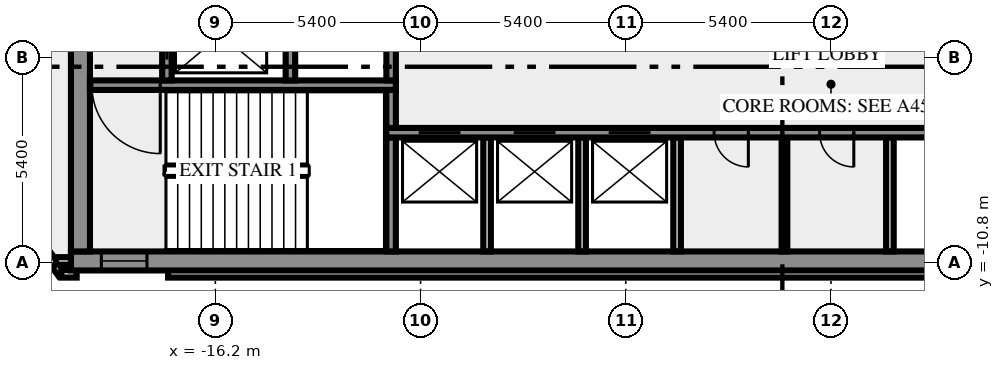
"""IFC4 building model, lengths in metres.
Left out: names, types, materials, properties, quantities, classifications, styles, units other than length and angle.
Written with IfcOpenShell. Run it as: python <this file> out.ifc"""

import sys

from ifc_helpers import new_model, si_unit, direction, frame, frame_2d, origin, place, context, subcontext, project, spatial, rectangle, extrude, element, fill, save


model = new_model("IFC4")
c1 = context("Model", 3, precision=1e-05, world=origin(), true_north=direction((0.0, 1.0)))
c2 = subcontext(c1, "Body", "Model", "MODEL_VIEW")
j1 = project(units=[si_unit("LENGTHUNIT", "METRE"), si_unit("PLANEANGLEUNIT", "RADIAN")], contexts=[c1])
p1 = place(None, origin())
s1 = spatial("IfcSite", under=j1, at=p1, CompositionType="ELEMENT")
p2 = place(p1, origin())
s2 = spatial("IfcBuilding", under=s1, at=p2, CompositionType="ELEMENT")
p3 = place(p2, frame((0.0, 0.0, 47.0)))
s3 = spatial("IfcBuildingStorey", under=s2, at=p3, CompositionType="ELEMENT", Elevation=47.0)
p4 = place(p3, frame((-21.833, -8.909, 0.0), z_axis=(0.0, 0.0, 1.0), x_axis=(0.587766567315, -0.809030569476, 0.0)))
e1 = element("IfcWall", 1, at=p4, inside=s3, PredefinedType="SOLIDWALL", context=c2, shape_type="SweptSolid", body=[
    extrude(rectangle(XDim=2.688, YDim=0.2, at=frame_2d((1.344, 0.0))), origin(), (0.0, 0.0, 1.0), 3.65),
])
p5 = place(p3, frame((-20.256, -11.088, 0.0), z_axis=(0.0, 0.0, 1.0), x_axis=(1.0, 0.0, 0.0)))
e2 = element("IfcWall", 2, at=p5, inside=s3, PredefinedType="SOLIDWALL", context=c2, shape_type="SweptSolid", body=[
    extrude(rectangle(XDim=0.406, YDim=0.2, at=frame_2d((0.203, 0.0))), origin(), (0.0, 0.0, 1.0), 3.65),
])
p6 = place(p3, frame((-17.444, -11.088, 0.0), z_axis=(0.0, 0.0, 1.0), x_axis=(1.0, 0.0, 0.0)))
e3 = element("IfcWall", 3, at=p6, inside=s3, PredefinedType="SOLIDWALL", context=c2, shape_type="SweptSolid", body=[
    extrude(rectangle(XDim=34.888, YDim=0.2, at=frame_2d((17.444, 0.0))), origin(), (0.0, 0.0, 1.0), 3.65),
])
p7 = place(p3, frame((-19.98, -10.75, 0.0), z_axis=(0.0, 0.0, 1.0), x_axis=(-1.0, 0.0, 0.0)))
e4 = element("IfcWall", 4, at=p7, inside=s3, PredefinedType="SOLIDWALL", context=c2, shape_type="SweptSolid", body=[
    extrude(rectangle(XDim=0.417, YDim=0.2, at=frame_2d((0.208, 0.0))), origin(), (0.0, 0.0, 1.0), 3.65),
])
p8 = place(p3, frame((-20.0, -10.75, 0.0), z_axis=(0.0, 0.0, 1.0), x_axis=(1.0, 0.0, 0.0)))
e5 = element("IfcWall", 5, at=p8, inside=s3, PredefinedType="SHEAR", context=c2, shape_type="SweptSolid", body=[
    extrude(rectangle(XDim=40.0, YDim=0.5, at=frame_2d((20.0, 0.0))), origin(), (0.0, 0.0, 1.0), 3.65),
])
p9 = place(p8, frame((0.8, 0.0, 1.0)))
e6 = element("IfcOpeningElement", 6, at=p9, cuts=e5, PredefinedType="OPENING", context=c2, shape_type="SweptSolid", body=[
    extrude(rectangle(XDim=1.2, YDim=1.2, at=frame_2d((0.6, 0.6))), frame((0.0, 0.26, 0.0), z_axis=(0.0, -1.0, 0.0), x_axis=(1.0, 0.0, 0.0)), (0.0, 0.0, 1.0), 0.52),
])
p10 = place(p8, frame((38.0, 0.0, 1.0)))
e7 = element("IfcOpeningElement", 7, at=p10, cuts=e5, PredefinedType="OPENING", context=c2, shape_type="SweptSolid", body=[
    extrude(rectangle(XDim=1.2, YDim=1.2, at=frame_2d((0.6, 0.6))), frame((0.0, 0.26, 0.0), z_axis=(0.0, -1.0, 0.0), x_axis=(1.0, 0.0, 0.0)), (0.0, 0.0, 1.0), 0.52),
])
p11 = place(p3, frame((-19.75, -10.5, 0.0), z_axis=(0.0, 0.0, 1.0), x_axis=(0.0, 1.0, 0.0)))
e8 = element("IfcWall", 8, at=p11, inside=s3, PredefinedType="SHEAR", context=c2, shape_type="SweptSolid", body=[
    extrude(rectangle(XDim=8.8, YDim=0.5, at=frame_2d((4.4, 0.0))), origin(), (0.0, 0.0, 1.0), 3.65),
])
p12 = place(p3, frame((-11.575, -10.5, 0.0), z_axis=(0.0, 0.0, 1.0), x_axis=(0.0, 1.0, 0.0)))
e9 = element("IfcWall", 9, at=p12, inside=s3, PredefinedType="SHEAR", context=c2, shape_type="SweptSolid", body=[
    extrude(rectangle(XDim=3.0, YDim=0.25, at=frame_2d((1.5, 0.0))), origin(), (0.0, 0.0, 1.0), 3.65),
])
for number, where, z_axis, x_axis in (
    (10, (-9.05, -10.5, 0.0), (0.0, 0.0, 1.0), (0.0, 1.0, 0.0)),
    (11, (-6.55, -10.5, 0.0), (0.0, 0.0, 1.0), (0.0, 1.0, 0.0)),
    (12, (-4.05, -10.5, 0.0), (0.0, 0.0, 1.0), (0.0, 1.0, 0.0)),
):
    element("IfcWall", number, at=place(p3, frame(where, z_axis=z_axis, x_axis=x_axis)), inside=s3, PredefinedType="SOLIDWALL", context=c2, shape_type="SweptSolid", body=[
        extrude(rectangle(XDim=3.0, YDim=0.2, at=frame_2d((1.5, 0.0))), origin(), (0.0, 0.0, 1.0), 3.65),
    ])
p13 = place(p3, frame((-1.225, -10.5, 0.0), z_axis=(0.0, 0.0, 1.0), x_axis=(0.0, 1.0, 0.0)))
e13 = element("IfcWall", 13, at=p13, inside=s3, PredefinedType="PARTITIONING", context=c2, shape_type="SweptSolid", body=[
    extrude(rectangle(XDim=3.0, YDim=0.15, at=frame_2d((1.5, 0.0))), origin(), (0.0, 0.0, 1.0), 3.65),
])
p14 = place(p3, frame((1.55, -10.5, 0.0), z_axis=(0.0, 0.0, 1.0), x_axis=(0.0, 1.0, 0.0)))
e14 = element("IfcWall", 14, at=p14, inside=s3, PredefinedType="SOLIDWALL", context=c2, shape_type="SweptSolid", body=[
    extrude(rectangle(XDim=3.0, YDim=0.2, at=frame_2d((1.5, 0.0))), origin(), (0.0, 0.0, 1.0), 3.65),
])
p15 = place(p3, frame((11.7, -7.375, 0.0), z_axis=(0.0, 0.0, 1.0), x_axis=(-1.0, 0.0, 0.0)))
e15 = element("IfcWall", 15, at=p15, inside=s3, PredefinedType="SHEAR", context=c2, shape_type="SweptSolid", body=[
    extrude(rectangle(XDim=23.4, YDim=0.25, at=frame_2d((11.7, 0.0))), origin(), (0.0, 0.0, 1.0), 3.65),
])
p16 = place(p15, frame((21.45, 0.0, 0.0)))
e16 = element("IfcOpeningElement", 16, at=p16, cuts=e15, PredefinedType="OPENING", context=c2, shape_type="SweptSolid", body=[
    extrude(rectangle(XDim=1.1, YDim=2.1, at=frame_2d((0.55, 1.05))), frame((0.0, 0.135, 0.0), z_axis=(0.0, -1.0, 0.0), x_axis=(1.0, 0.0, 0.0)), (0.0, 0.0, 1.0), 0.27),
])
p17 = place(p15, frame((18.95, 0.0, 0.0)))
e17 = element("IfcOpeningElement", 17, at=p17, cuts=e15, PredefinedType="OPENING", context=c2, shape_type="SweptSolid", body=[
    extrude(rectangle(XDim=1.1, YDim=2.1, at=frame_2d((0.55, 1.05))), frame((0.0, 0.135, 0.0), z_axis=(0.0, -1.0, 0.0), x_axis=(1.0, 0.0, 0.0)), (0.0, 0.0, 1.0), 0.27),
])
p18 = place(p15, frame((16.45, 0.0, 0.0)))
e18 = element("IfcOpeningElement", 18, at=p18, cuts=e15, PredefinedType="OPENING", context=c2, shape_type="SweptSolid", body=[
    extrude(rectangle(XDim=1.1, YDim=2.1, at=frame_2d((0.55, 1.05))), frame((0.0, 0.135, 0.0), z_axis=(0.0, -1.0, 0.0), x_axis=(1.0, 0.0, 0.0)), (0.0, 0.0, 1.0), 0.27),
])
p19 = place(p15, frame((13.875, 0.0, 0.0)))
e19 = element("IfcOpeningElement", 19, at=p19, cuts=e15, PredefinedType="OPENING", context=c2, shape_type="SweptSolid", body=[
    extrude(rectangle(XDim=0.9, YDim=2.1, at=frame_2d((0.45, 1.05))), frame((0.0, 0.135, 0.0), z_axis=(0.0, -1.0, 0.0), x_axis=(1.0, 0.0, 0.0)), (0.0, 0.0, 1.0), 0.27),
])
p20 = place(p15, frame((11.1, 0.0, 0.0)))
e20 = element("IfcOpeningElement", 20, at=p20, cuts=e15, PredefinedType="OPENING", context=c2, shape_type="SweptSolid", body=[
    extrude(rectangle(XDim=0.9, YDim=2.1, at=frame_2d((0.45, 1.05))), frame((0.0, 0.135, 0.0), z_axis=(0.0, -1.0, 0.0), x_axis=(1.0, 0.0, 0.0)), (0.0, 0.0, 1.0), 0.27),
])
p21 = place(p3, frame((-11.575, -7.25, 0.0), z_axis=(0.0, 0.0, 1.0), x_axis=(0.0, 1.0, 0.0)))
e21 = element("IfcWall", 21, at=p21, inside=s3, PredefinedType="SHEAR", context=c2, shape_type="SweptSolid", body=[
    extrude(rectangle(XDim=1.0, YDim=0.25, at=frame_2d((0.5, 0.0))), origin(), (0.0, 0.0, 1.0), 3.65),
])
p22 = place(p3, frame((-11.45, -6.125, 0.0), z_axis=(0.0, 0.0, 1.0), x_axis=(-1.0, 0.0, 0.0)))
e22 = element("IfcWall", 22, at=p22, inside=s3, PredefinedType="SHEAR", context=c2, shape_type="SweptSolid", body=[
    extrude(rectangle(XDim=8.05, YDim=0.25, at=frame_2d((4.025, 0.0))), origin(), (0.0, 0.0, 1.0), 3.65),
])
p23 = place(p22, frame((6.2, 0.0, 0.0)))
e23 = element("IfcOpeningElement", 23, at=p23, cuts=e22, PredefinedType="OPENING", context=c2, shape_type="SweptSolid", body=[
    extrude(rectangle(XDim=1.8, YDim=2.1, at=frame_2d((0.9, 1.05))), frame((0.0, 0.135, 0.0), z_axis=(0.0, -1.0, 0.0), x_axis=(1.0, 0.0, 0.0)), (0.0, 0.0, 1.0), 0.27),
])
p24 = place(p3, frame((-17.475, -6.0, 0.0), z_axis=(0.0, 0.0, 1.0), x_axis=(0.0, 1.0, 0.0)))
e24 = element("IfcWall", 24, at=p24, inside=s3, PredefinedType="SHEAR", context=c2, shape_type="SweptSolid", body=[
    extrude(rectangle(XDim=4.3, YDim=0.25, at=frame_2d((2.15, 0.0))), origin(), (0.0, 0.0, 1.0), 3.65),
])
p25 = place(p24, frame((0.55, 0.0, 0.0)))
e25 = element("IfcOpeningElement", 25, at=p25, cuts=e24, PredefinedType="OPENING", context=c2, shape_type="SweptSolid", body=[
    extrude(rectangle(XDim=1.3, YDim=2.1, at=frame_2d((0.65, 1.05))), frame((0.0, 0.135, 0.0), z_axis=(0.0, -1.0, 0.0), x_axis=(1.0, 0.0, 0.0)), (0.0, 0.0, 1.0), 0.27),
])
for number, where, z_axis, x_axis in (
    (26, (-14.225, -6.0, 0.0), (0.0, 0.0, 1.0), (0.0, 1.0, 0.0)),
    (27, (-11.575, -6.0, 0.0), (0.0, 0.0, 1.0), (0.0, 1.0, 0.0)),
):
    element("IfcWall", number, at=place(p3, frame(where, z_axis=z_axis, x_axis=x_axis)), inside=s3, PredefinedType="SHEAR", context=c2, shape_type="SweptSolid", body=[
        extrude(rectangle(XDim=1.75, YDim=0.25, at=frame_2d((0.875, 0.0))), origin(), (0.0, 0.0, 1.0), 3.65),
    ])
p26 = place(p9, origin())
e28 = element("IfcWindow", 28, at=p26, inside=s3, PartitioningType="SINGLE_PANEL", PredefinedType="WINDOW", context=c2, shape_type="SweptSolid", body=[
    extrude(rectangle(XDim=1.2, YDim=1.2, at=frame_2d((0.6, 0.6))), frame((0.0, 0.03, 0.0), z_axis=(0.0, -1.0, 0.0), x_axis=(1.0, 0.0, 0.0)), (0.0, 0.0, 1.0), 0.06),
])
fill(e6, e28)
p27 = place(p16, origin())
e29 = element("IfcDoor", 29, at=p27, inside=s3, OperationType="DOUBLE_DOOR_SLIDING", PredefinedType="DOOR", context=c2, shape_type="SweptSolid", body=[
    extrude(rectangle(XDim=1.1, YDim=2.1, at=frame_2d((0.55, 1.05))), frame((0.0, 0.025, 0.0), z_axis=(0.0, -1.0, 0.0), x_axis=(1.0, 0.0, 0.0)), (0.0, 0.0, 1.0), 0.05),
])
fill(e16, e29)
p28 = place(p17, origin())
e30 = element("IfcDoor", 30, at=p28, inside=s3, OperationType="DOUBLE_DOOR_SLIDING", PredefinedType="DOOR", context=c2, shape_type="SweptSolid", body=[
    extrude(rectangle(XDim=1.1, YDim=2.1, at=frame_2d((0.55, 1.05))), frame((0.0, 0.025, 0.0), z_axis=(0.0, -1.0, 0.0), x_axis=(1.0, 0.0, 0.0)), (0.0, 0.0, 1.0), 0.05),
])
fill(e17, e30)
p29 = place(p18, origin())
e31 = element("IfcDoor", 31, at=p29, inside=s3, OperationType="DOUBLE_DOOR_SLIDING", PredefinedType="DOOR", context=c2, shape_type="SweptSolid", body=[
    extrude(rectangle(XDim=1.1, YDim=2.1, at=frame_2d((0.55, 1.05))), frame((0.0, 0.025, 0.0), z_axis=(0.0, -1.0, 0.0), x_axis=(1.0, 0.0, 0.0)), (0.0, 0.0, 1.0), 0.05),
])
fill(e18, e31)
p30 = place(p19, origin())
e32 = element("IfcDoor", 32, at=p30, inside=s3, OperationType="SINGLE_SWING_RIGHT", PredefinedType="DOOR", context=c2, shape_type="SweptSolid", body=[
    extrude(rectangle(XDim=0.9, YDim=2.1, at=frame_2d((0.45, 1.05))), frame((0.0, 0.025, 0.0), z_axis=(0.0, -1.0, 0.0), x_axis=(1.0, 0.0, 0.0)), (0.0, 0.0, 1.0), 0.05),
])
fill(e19, e32)
p31 = place(p20, origin())
e33 = element("IfcDoor", 33, at=p31, inside=s3, OperationType="SINGLE_SWING_LEFT", PredefinedType="DOOR", context=c2, shape_type="SweptSolid", body=[
    extrude(rectangle(XDim=0.9, YDim=2.1, at=frame_2d((0.45, 1.05))), frame((0.0, 0.025, 0.0), z_axis=(0.0, -1.0, 0.0), x_axis=(1.0, 0.0, 0.0)), (0.0, 0.0, 1.0), 0.05),
])
fill(e20, e33)
p32 = place(p23, origin())
e34 = element("IfcDoor", 34, at=p32, inside=s3, OperationType="DOUBLE_DOOR_SINGLE_SWING", PredefinedType="DOOR", context=c2, shape_type="SweptSolid", body=[
    extrude(rectangle(XDim=1.8, YDim=2.1, at=frame_2d((0.9, 1.05))), frame((0.0, 0.025, 0.0), z_axis=(0.0, -1.0, 0.0), x_axis=(1.0, 0.0, 0.0)), (0.0, 0.0, 1.0), 0.05),
])
fill(e23, e34)
p33 = place(p25, origin())
e35 = element("IfcDoor", 35, at=p33, inside=s3, OperationType="DOUBLE_DOOR_SLIDING", PredefinedType="DOOR", context=c2, shape_type="SweptSolid", body=[
    extrude(rectangle(XDim=1.3, YDim=2.1, at=frame_2d((0.65, 1.05))), frame((0.0, 0.025, 0.0), z_axis=(0.0, -1.0, 0.0), x_axis=(1.0, 0.0, 0.0)), (0.0, 0.0, 1.0), 0.05),
])
fill(e25, e35)
save(model, sys.argv[1])
